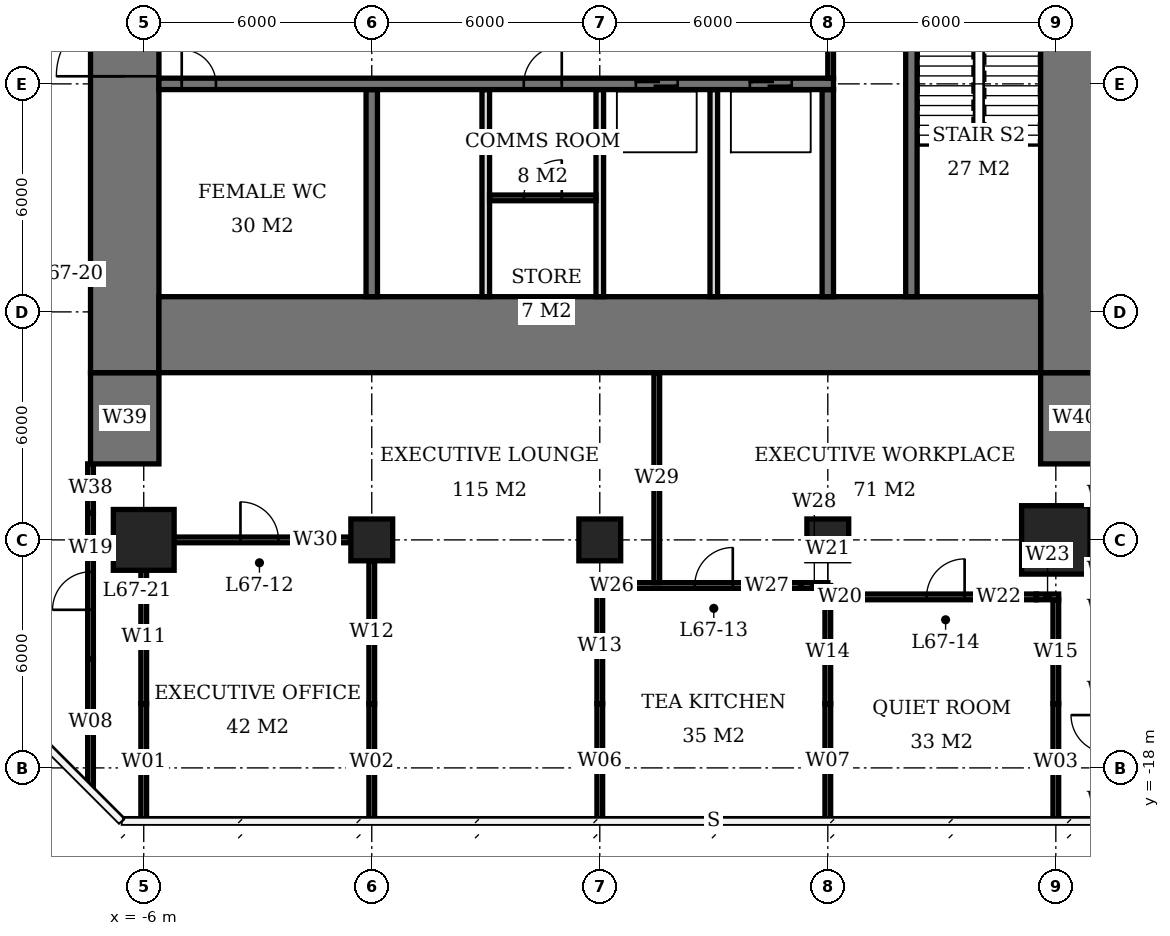
"""IFC4 building model, lengths in metres.
Left out: names, types, materials, properties, quantities, classifications, styles, units other than length and angle.
Written with IfcOpenShell. Run it as: python <this file> out.ifc"""

import sys

from ifc_helpers import new_model, si_unit, direction, frame, frame_2d, origin, origin_2d, place, context, subcontext, project, spatial, rectangle, extrude, element, fill, save


model = new_model("IFC4")
c1 = context("Model", 3, precision=1e-05, world=origin(), true_north=direction((0.0, 1.0)))
c2 = subcontext(c1, "Body", "Model", "MODEL_VIEW")
j1 = project(units=[si_unit("LENGTHUNIT", "METRE"), si_unit("PLANEANGLEUNIT", "RADIAN")], contexts=[c1])
p1 = place(None, origin())
s1 = spatial("IfcSite", under=j1, at=p1, CompositionType="ELEMENT")
p2 = place(p1, origin())
s2 = spatial("IfcBuilding", under=s1, at=p2, CompositionType="ELEMENT")
p3 = place(p2, frame((0.0, 0.0, 272.3)))
s3 = spatial("IfcBuildingStorey", under=s2, at=p3, CompositionType="ELEMENT", Elevation=272.3)
p4 = place(p3, frame((-6.0, -12.0, 0.0), z_axis=(0.0, 0.0, 1.0), x_axis=(1.0, 0.0, 0.0)))
e1 = element("IfcColumn", 1, at=p4, inside=s3, PredefinedType="COLUMN", context=c2, shape_type="SweptSolid", body=[
    extrude(rectangle(XDim=1.6, YDim=1.6, at=origin_2d()), origin(), (0.0, 0.0, 1.0), 3.9),
])
for number, where, z_axis, x_axis in (
    (2, (0.0, -12.0, 0.0), (0.0, 0.0, 1.0), (1.0, 0.0, 0.0)),
    (3, (6.0, -12.0, 0.0), (0.0, 0.0, 1.0), (1.0, 0.0, 0.0)),
    (4, (12.0, -12.0, 0.0), (0.0, 0.0, 1.0), (1.0, 0.0, 0.0)),
):
    element("IfcColumn", number, at=place(p3, frame(where, z_axis=z_axis, x_axis=x_axis)), inside=s3, PredefinedType="COLUMN", context=c2, shape_type="SweptSolid", body=[
        extrude(rectangle(XDim=1.1, YDim=1.1, at=origin_2d()), origin(), (0.0, 0.0, 1.0), 3.9),
    ])
p5 = place(p3, frame((18.0, -12.0, 0.0), z_axis=(0.0, 0.0, 1.0), x_axis=(1.0, 0.0, 0.0)))
e5 = element("IfcColumn", 5, at=p5, inside=s3, PredefinedType="COLUMN", context=c2, shape_type="SweptSolid", body=[
    extrude(rectangle(XDim=1.8, YDim=1.8, at=origin_2d()), origin(), (0.0, 0.0, 1.0), 3.9),
])
p6 = place(p3, frame((-5.6, -6.6, 0.0), z_axis=(0.0, 0.0, 1.0), x_axis=(1.0, 0.0, 0.0)))
e6 = element("IfcWall", 6, at=p6, inside=s3, PredefinedType="SHEAR", context=c2, shape_type="SweptSolid", body=[
    extrude(rectangle(XDim=23.2, YDim=2.0, at=frame_2d((11.6, 0.0))), origin(), (0.0, 0.0, 1.0), 3.9),
])
p7 = place(p3, frame((-6.5, -7.6, 0.0), z_axis=(0.0, 0.0, 1.0), x_axis=(0.0, 1.0, 0.0)))
e7 = element("IfcWall", 7, at=p7, inside=s3, PredefinedType="SHEAR", context=c2, shape_type="SweptSolid", body=[
    extrude(rectangle(XDim=21.2, YDim=1.8, at=frame_2d((10.6, 0.0))), origin(), (0.0, 0.0, 1.0), 3.9),
])
p8 = place(p7, frame((7.8, 0.0, 0.0)))
e8 = element("IfcOpeningElement", 8, at=p8, cuts=e7, PredefinedType="OPENING", context=c2, shape_type="SweptSolid", body=[
    extrude(rectangle(XDim=1.8, YDim=2.4, at=frame_2d((0.9, 1.2))), frame((0.0, 0.91, 0.0), z_axis=(0.0, -1.0, 0.0), x_axis=(1.0, 0.0, 0.0)), (0.0, 0.0, 1.0), 1.82),
])
p9 = place(p3, frame((18.5, -7.6, 0.0), z_axis=(0.0, 0.0, 1.0), x_axis=(0.0, 1.0, 0.0)))
e9 = element("IfcWall", 9, at=p9, inside=s3, PredefinedType="SHEAR", context=c2, shape_type="SweptSolid", body=[
    extrude(rectangle(XDim=21.2, YDim=1.8, at=frame_2d((10.6, 0.0))), origin(), (0.0, 0.0, 1.0), 3.9),
])
p10 = place(p9, frame((9.2, 0.0, 0.0)))
e10 = element("IfcOpeningElement", 10, at=p10, cuts=e9, PredefinedType="OPENING", context=c2, shape_type="SweptSolid", body=[
    extrude(rectangle(XDim=1.8, YDim=2.4, at=frame_2d((0.9, 1.2))), frame((0.0, 0.91, 0.0), z_axis=(0.0, -1.0, 0.0), x_axis=(1.0, 0.0, 0.0)), (0.0, 0.0, 1.0), 1.82),
])
for number, where, z_axis, x_axis in (
    (11, (-6.5, -10.0, 0.0), (0.0, 0.0, 1.0), (0.0, 1.0, 0.0)),
    (12, (18.5, -10.0, 0.0), (0.0, 0.0, 1.0), (0.0, 1.0, 0.0)),
):
    element("IfcWall", number, at=place(p3, frame(where, z_axis=z_axis, x_axis=x_axis)), inside=s3, PredefinedType="SHEAR", context=c2, shape_type="SweptSolid", body=[
        extrude(rectangle(XDim=2.4, YDim=1.8, at=frame_2d((1.2, 0.0))), origin(), (0.0, 0.0, 1.0), 3.9),
    ])
p11 = place(p3, frame((-5.6, 0.0, 0.0), z_axis=(0.0, 0.0, 1.0), x_axis=(1.0, 0.0, 0.0)))
e13 = element("IfcWall", 13, at=p11, inside=s3, PredefinedType="SHEAR", context=c2, shape_type="SweptSolid", body=[
    extrude(rectangle(XDim=17.75, YDim=0.3, at=frame_2d((8.875, 0.0))), origin(), (0.0, 0.0, 1.0), 3.9),
])
p12 = place(p11, frame((0.6, 0.0, 0.0)))
e14 = element("IfcOpeningElement", 14, at=p12, cuts=e13, PredefinedType="OPENING", context=c2, shape_type="SweptSolid", body=[
    extrude(rectangle(XDim=0.9, YDim=2.1, at=frame_2d((0.45, 1.05))), frame((0.0, 0.16, 0.0), z_axis=(0.0, -1.0, 0.0), x_axis=(1.0, 0.0, 0.0)), (0.0, 0.0, 1.0), 0.32),
])
p13 = place(p11, frame((9.6, 0.0, 0.0)))
e15 = element("IfcOpeningElement", 15, at=p13, cuts=e13, PredefinedType="OPENING", context=c2, shape_type="SweptSolid", body=[
    extrude(rectangle(XDim=1.0, YDim=2.1, at=frame_2d((0.5, 1.05))), frame((0.0, 0.16, 0.0), z_axis=(0.0, -1.0, 0.0), x_axis=(1.0, 0.0, 0.0)), (0.0, 0.0, 1.0), 0.32),
])
p14 = place(p11, frame((12.55, 0.0, 0.0)))
e16 = element("IfcOpeningElement", 16, at=p14, cuts=e13, PredefinedType="OPENING", context=c2, shape_type="SweptSolid", body=[
    extrude(rectangle(XDim=1.1, YDim=2.1, at=frame_2d((0.55, 1.05))), frame((0.0, 0.16, 0.0), z_axis=(0.0, -1.0, 0.0), x_axis=(1.0, 0.0, 0.0)), (0.0, 0.0, 1.0), 0.32),
])
p15 = place(p11, frame((15.55, 0.0, 0.0)))
e17 = element("IfcOpeningElement", 17, at=p15, cuts=e13, PredefinedType="OPENING", context=c2, shape_type="SweptSolid", body=[
    extrude(rectangle(XDim=1.1, YDim=2.1, at=frame_2d((0.55, 1.05))), frame((0.0, 0.16, 0.0), z_axis=(0.0, -1.0, 0.0), x_axis=(1.0, 0.0, 0.0)), (0.0, 0.0, 1.0), 0.32),
])
for number, where, z_axis, x_axis in (
    (18, (0.0, -5.6, 0.0), (0.0, 0.0, 1.0), (0.0, 1.0, 0.0)),
    (19, (12.0, -5.6, 0.0), (0.0, 0.0, 1.0), (0.0, 1.0, 0.0)),
):
    element("IfcWall", number, at=place(p3, frame(where, z_axis=z_axis, x_axis=x_axis)), inside=s3, PredefinedType="SHEAR", context=c2, shape_type="SweptSolid", body=[
        extrude(rectangle(XDim=5.45, YDim=0.3, at=frame_2d((2.725, 0.0))), origin(), (0.0, 0.0, 1.0), 3.9),
    ])
p16 = place(p3, frame((14.2, -5.6, 0.0), z_axis=(0.0, 0.0, 1.0), x_axis=(0.0, 1.0, 0.0)))
e20 = element("IfcWall", 20, at=p16, inside=s3, PredefinedType="SHEAR", context=c2, shape_type="SweptSolid", body=[
    extrude(rectangle(XDim=8.45, YDim=0.3, at=frame_2d((4.225, 0.0))), origin(), (0.0, 0.0, 1.0), 3.9),
])
for number, where, z_axis, x_axis in (
    (21, (3.0, -5.6, 0.0), (0.0, 0.0, 1.0), (0.0, 1.0, 0.0)),
    (22, (6.0, -5.6, 0.0), (0.0, 0.0, 1.0), (0.0, 1.0, 0.0)),
    (23, (9.0, -5.6, 0.0), (0.0, 0.0, 1.0), (0.0, 1.0, 0.0)),
):
    element("IfcWall", number, at=place(p3, frame(where, z_axis=z_axis, x_axis=x_axis)), inside=s3, PredefinedType="SOLIDWALL", context=c2, shape_type="SweptSolid", body=[
        extrude(rectangle(XDim=5.45, YDim=0.2, at=frame_2d((2.725, 0.0))), origin(), (0.0, 0.0, 1.0), 3.9),
    ])
p17 = place(p3, frame((3.1, -3.0, 0.0), z_axis=(0.0, 0.0, 1.0), x_axis=(1.0, 0.0, 0.0)))
e24 = element("IfcWall", 24, at=p17, inside=s3, PredefinedType="PARTITIONING", context=c2, shape_type="SweptSolid", body=[
    extrude(rectangle(XDim=2.8, YDim=0.15, at=frame_2d((1.4, 0.0))), origin(), (0.0, 0.0, 1.0), 3.65),
])
p18 = place(p17, frame((0.9, 0.0, 0.0)))
e25 = element("IfcOpeningElement", 25, at=p18, cuts=e24, PredefinedType="OPENING", context=c2, shape_type="SweptSolid", body=[
    extrude(rectangle(XDim=1.0, YDim=2.1, at=frame_2d((0.5, 1.05))), frame((0.0, 0.085, 0.0), z_axis=(0.0, -1.0, 0.0), x_axis=(1.0, 0.0, 0.0)), (0.0, 0.0, 1.0), 0.17),
])
p19 = place(p3, frame((11.925, -13.5, 0.0), z_axis=(0.0, 0.0, 1.0), x_axis=(1.0, 0.0, 0.0)))
e26 = element("IfcWall", 26, at=p19, inside=s3, PredefinedType="PARTITIONING", context=c2, shape_type="SweptSolid", body=[
    extrude(rectangle(XDim=0.785, YDim=0.15, at=frame_2d((0.393, 0.0))), origin(), (0.0, 0.0, 1.0), 2.65),
])
p20 = place(p3, frame((12.71, -13.5, 0.0), z_axis=(0.0, 0.0, 1.0), x_axis=(1.0, 0.0, 0.0)))
e27 = element("IfcWall", 27, at=p20, inside=s3, PredefinedType="PARTITIONING", context=c2, shape_type="SweptSolid", body=[
    extrude(rectangle(XDim=4.78, YDim=0.15, at=frame_2d((2.39, 0.0))), origin(), (0.0, 0.0, 1.0), 3.65),
])
p21 = place(p20, frame((1.89, 0.0, 0.0)))
e28 = element("IfcOpeningElement", 28, at=p21, cuts=e27, PredefinedType="OPENING", context=c2, shape_type="SweptSolid", body=[
    extrude(rectangle(XDim=1.0, YDim=2.4, at=frame_2d((0.5, 1.2))), frame((0.0, 0.085, 0.0), z_axis=(0.0, -1.0, 0.0), x_axis=(1.0, 0.0, 0.0)), (0.0, 0.0, 1.0), 0.17),
])
p22 = place(p3, frame((17.49, -13.5, 0.0), z_axis=(0.0, 0.0, 1.0), x_axis=(1.0, 0.0, 0.0)))
e29 = element("IfcWall", 29, at=p22, inside=s3, PredefinedType="PARTITIONING", context=c2, shape_type="SweptSolid", body=[
    extrude(rectangle(XDim=0.585, YDim=0.15, at=frame_2d((0.292, 0.0))), origin(), (0.0, 0.0, 1.0), 2.65),
])
p23 = place(p3, frame((5.925, -13.2, 0.0), z_axis=(0.0, 0.0, 1.0), x_axis=(1.0, 0.0, 0.0)))
e30 = element("IfcWall", 30, at=p23, inside=s3, PredefinedType="PARTITIONING", context=c2, shape_type="SweptSolid", body=[
    extrude(rectangle(XDim=0.785, YDim=0.15, at=frame_2d((0.393, 0.0))), origin(), (0.0, 0.0, 1.0), 2.65),
])
p24 = place(p3, frame((6.71, -13.2, 0.0), z_axis=(0.0, 0.0, 1.0), x_axis=(1.0, 0.0, 0.0)))
e31 = element("IfcWall", 31, at=p24, inside=s3, PredefinedType="PARTITIONING", context=c2, shape_type="SweptSolid", body=[
    extrude(rectangle(XDim=4.58, YDim=0.15, at=frame_2d((2.29, 0.0))), origin(), (0.0, 0.0, 1.0), 3.65),
])
p25 = place(p24, frame((1.79, 0.0, 0.0)))
e32 = element("IfcOpeningElement", 32, at=p25, cuts=e31, PredefinedType="OPENING", context=c2, shape_type="SweptSolid", body=[
    extrude(rectangle(XDim=1.0, YDim=2.4, at=frame_2d((0.5, 1.2))), frame((0.0, 0.085, 0.0), z_axis=(0.0, -1.0, 0.0), x_axis=(1.0, 0.0, 0.0)), (0.0, 0.0, 1.0), 0.17),
])
p26 = place(p3, frame((11.29, -13.2, 0.0), z_axis=(0.0, 0.0, 1.0), x_axis=(1.0, 0.0, 0.0)))
e33 = element("IfcWall", 33, at=p26, inside=s3, PredefinedType="PARTITIONING", context=c2, shape_type="SweptSolid", body=[
    extrude(rectangle(XDim=0.71, YDim=0.15, at=frame_2d((0.355, 0.0))), origin(), (0.0, 0.0, 1.0), 2.65),
])
p27 = place(p3, frame((-5.2, -12.0, 0.0), z_axis=(0.0, 0.0, 1.0), x_axis=(1.0, 0.0, 0.0)))
e34 = element("IfcWall", 34, at=p27, inside=s3, PredefinedType="PARTITIONING", context=c2, shape_type="SweptSolid", body=[
    extrude(rectangle(XDim=4.64, YDim=0.15, at=frame_2d((2.32, 0.0))), origin(), (0.0, 0.0, 1.0), 3.65),
])
p28 = place(p27, frame((1.745, 0.0, 0.0)))
e35 = element("IfcOpeningElement", 35, at=p28, cuts=e34, PredefinedType="OPENING", context=c2, shape_type="SweptSolid", body=[
    extrude(rectangle(XDim=1.0, YDim=2.4, at=frame_2d((0.5, 1.2))), frame((0.0, 0.085, 0.0), z_axis=(0.0, -1.0, 0.0), x_axis=(1.0, 0.0, 0.0)), (0.0, 0.0, 1.0), 0.17),
])
p29 = place(p3, frame((-6.0, -19.375, 0.0), z_axis=(0.0, 0.0, 1.0), x_axis=(0.0, 1.0, 0.0)))
e36 = element("IfcWall", 36, at=p29, inside=s3, PredefinedType="PARTITIONING", context=c2, shape_type="SweptSolid", body=[
    extrude(rectangle(XDim=3.065, YDim=0.15, at=frame_2d((1.532, 0.0))), origin(), (0.0, 0.0, 1.0), 3.65),
])
p30 = place(p3, frame((-6.0, -16.31, 0.0), z_axis=(0.0, 0.0, 1.0), x_axis=(0.0, 1.0, 0.0)))
e37 = element("IfcWall", 37, at=p30, inside=s3, PredefinedType="PARTITIONING", context=c2, shape_type="SweptSolid", body=[
    extrude(rectangle(XDim=3.51, YDim=0.15, at=frame_2d((1.755, 0.0))), origin(), (0.0, 0.0, 1.0), 2.65),
])
p31 = place(p3, frame((0.0, -19.375, 0.0), z_axis=(0.0, 0.0, 1.0), x_axis=(0.0, 1.0, 0.0)))
e38 = element("IfcWall", 38, at=p31, inside=s3, PredefinedType="PARTITIONING", context=c2, shape_type="SweptSolid", body=[
    extrude(rectangle(XDim=3.065, YDim=0.15, at=frame_2d((1.532, 0.0))), origin(), (0.0, 0.0, 1.0), 3.65),
])
p32 = place(p3, frame((0.0, -16.31, 0.0), z_axis=(0.0, 0.0, 1.0), x_axis=(0.0, 1.0, 0.0)))
e39 = element("IfcWall", 39, at=p32, inside=s3, PredefinedType="PARTITIONING", context=c2, shape_type="SweptSolid", body=[
    extrude(rectangle(XDim=3.76, YDim=0.15, at=frame_2d((1.88, 0.0))), origin(), (0.0, 0.0, 1.0), 2.65),
])
p33 = place(p3, frame((6.0, -19.35, 0.0), z_axis=(0.0, 0.0, 1.0), x_axis=(0.0, 1.0, 0.0)))
e40 = element("IfcWall", 40, at=p33, inside=s3, PredefinedType="PARTITIONING", context=c2, shape_type="SweptSolid", body=[
    extrude(rectangle(XDim=3.04, YDim=0.15, at=frame_2d((1.52, 0.0))), origin(), (0.0, 0.0, 1.0), 3.65),
])
p34 = place(p3, frame((6.0, -16.31, 0.0), z_axis=(0.0, 0.0, 1.0), x_axis=(0.0, 1.0, 0.0)))
e41 = element("IfcWall", 41, at=p34, inside=s3, PredefinedType="PARTITIONING", context=c2, shape_type="SweptSolid", body=[
    extrude(rectangle(XDim=3.035, YDim=0.15, at=frame_2d((1.518, 0.0))), origin(), (0.0, 0.0, 1.0), 2.65),
])
p35 = place(p3, frame((12.0, -19.35, 0.0), z_axis=(0.0, 0.0, 1.0), x_axis=(0.0, 1.0, 0.0)))
e42 = element("IfcWall", 42, at=p35, inside=s3, PredefinedType="PARTITIONING", context=c2, shape_type="SweptSolid", body=[
    extrude(rectangle(XDim=3.04, YDim=0.15, at=frame_2d((1.52, 0.0))), origin(), (0.0, 0.0, 1.0), 3.65),
])
p36 = place(p3, frame((12.0, -16.31, 0.0), z_axis=(0.0, 0.0, 1.0), x_axis=(0.0, 1.0, 0.0)))
e43 = element("IfcWall", 43, at=p36, inside=s3, PredefinedType="PARTITIONING", context=c2, shape_type="SweptSolid", body=[
    extrude(rectangle(XDim=2.735, YDim=0.15, at=frame_2d((1.368, 0.0))), origin(), (0.0, 0.0, 1.0), 2.65),
])
p37 = place(p3, frame((12.0, -13.5, 0.0), z_axis=(0.0, 0.0, 1.0), x_axis=(0.0, 1.0, 0.0)))
e44 = element("IfcWall", 44, at=p37, inside=s3, PredefinedType="PARTITIONING", context=c2, shape_type="SweptSolid", body=[
    extrude(rectangle(XDim=0.3, YDim=0.15, at=frame_2d((0.15, 0.0))), origin(), (0.0, 0.0, 1.0), 2.65),
])
p38 = place(p3, frame((18.0, -19.375, 0.0), z_axis=(0.0, 0.0, 1.0), x_axis=(0.0, 1.0, 0.0)))
e45 = element("IfcWall", 45, at=p38, inside=s3, PredefinedType="PARTITIONING", context=c2, shape_type="SweptSolid", body=[
    extrude(rectangle(XDim=3.065, YDim=0.15, at=frame_2d((1.532, 0.0))), origin(), (0.0, 0.0, 1.0), 3.65),
])
p39 = place(p3, frame((18.0, -16.31, 0.0), z_axis=(0.0, 0.0, 1.0), x_axis=(0.0, 1.0, 0.0)))
e46 = element("IfcWall", 46, at=p39, inside=s3, PredefinedType="PARTITIONING", context=c2, shape_type="SweptSolid", body=[
    extrude(rectangle(XDim=2.735, YDim=0.15, at=frame_2d((1.368, 0.0))), origin(), (0.0, 0.0, 1.0), 2.65),
])
p40 = place(p3, frame((-7.4, -18.464, 0.0), z_axis=(0.0, 0.0, 1.0), x_axis=(0.0, 1.0, 0.0)))
e47 = element("IfcWall", 47, at=p40, inside=s3, PredefinedType="PARTITIONING", context=c2, shape_type="SweptSolid", body=[
    extrude(rectangle(XDim=3.324, YDim=0.15, at=frame_2d((1.662, 0.0))), origin(), (0.0, 0.0, 1.0), 3.65),
])
p41 = place(p3, frame((-7.4, -15.14, 0.0), z_axis=(0.0, 0.0, 1.0), x_axis=(0.0, 1.0, 0.0)))
e48 = element("IfcWall", 48, at=p41, inside=s3, PredefinedType="PARTITIONING", context=c2, shape_type="SweptSolid", body=[
    extrude(rectangle(XDim=3.85, YDim=0.15, at=frame_2d((1.925, 0.0))), origin(), (0.0, 0.0, 1.0), 2.65),
])
p42 = place(p41, frame((1.3, 0.0, 0.0)))
e49 = element("IfcOpeningElement", 49, at=p42, cuts=e48, PredefinedType="OPENING", context=c2, shape_type="SweptSolid", body=[
    extrude(rectangle(XDim=1.0, YDim=2.1, at=frame_2d((0.5, 1.05))), frame((0.0, 0.085, 0.0), z_axis=(0.0, -1.0, 0.0), x_axis=(1.0, 0.0, 0.0)), (0.0, 0.0, 1.0), 0.17),
])
p43 = place(p3, frame((-7.4, -11.29, 0.0), z_axis=(0.0, 0.0, 1.0), x_axis=(0.0, 1.0, 0.0)))
e50 = element("IfcWall", 50, at=p43, inside=s3, PredefinedType="PARTITIONING", context=c2, shape_type="SweptSolid", body=[
    extrude(rectangle(XDim=1.29, YDim=0.15, at=frame_2d((0.645, 0.0))), origin(), (0.0, 0.0, 1.0), 3.65),
])
p44 = place(p3, frame((7.5, -13.125, 0.0), z_axis=(0.0, 0.0, 1.0), x_axis=(0.0, 1.0, 0.0)))
e51 = element("IfcWall", 51, at=p44, inside=s3, PredefinedType="PARTITIONING", context=c2, shape_type="SweptSolid", body=[
    extrude(rectangle(XDim=5.525, YDim=0.15, at=frame_2d((2.762, 0.0))), origin(), (0.0, 0.0, 1.0), 3.65),
])
p45 = place(p3, frame((12.075, 0.15, 0.0), z_axis=(0.0, 0.0, 1.0), x_axis=(0.0, 1.0, 0.0)))
e52 = element("IfcWall", 52, at=p45, inside=s3, PredefinedType="PARTITIONING", context=c2, shape_type="SweptSolid", body=[
    extrude(rectangle(XDim=3.0, YDim=0.15, at=frame_2d((1.5, 0.0))), origin(), (0.0, 0.0, 1.0), 3.65),
])
p46 = place(p8, origin())
e53 = element("IfcDoor", 53, at=p46, inside=s3, OperationType="DOUBLE_DOOR_SINGLE_SWING", PredefinedType="DOOR", context=c2, shape_type="SweptSolid", body=[
    extrude(rectangle(XDim=1.8, YDim=2.4, at=frame_2d((0.9, 1.2))), frame((0.0, 0.025, 0.0), z_axis=(0.0, -1.0, 0.0), x_axis=(1.0, 0.0, 0.0)), (0.0, 0.0, 1.0), 0.05),
])
fill(e8, e53)
p47 = place(p12, origin())
e54 = element("IfcDoor", 54, at=p47, inside=s3, OperationType="SINGLE_SWING_LEFT", PredefinedType="DOOR", context=c2, shape_type="SweptSolid", body=[
    extrude(rectangle(XDim=0.9, YDim=2.1, at=frame_2d((0.45, 1.05))), frame((0.0, 0.025, 0.0), z_axis=(0.0, -1.0, 0.0), x_axis=(1.0, 0.0, 0.0)), (0.0, 0.0, 1.0), 0.05),
])
fill(e14, e54)
p48 = place(p18, origin())
e55 = element("IfcDoor", 55, at=p48, inside=s3, OperationType="SINGLE_SWING_RIGHT", PredefinedType="DOOR", context=c2, shape_type="SweptSolid", body=[
    extrude(rectangle(XDim=1.0, YDim=2.1, at=frame_2d((0.5, 1.05))), frame((0.0, 0.025, 0.0), z_axis=(0.0, -1.0, 0.0), x_axis=(1.0, 0.0, 0.0)), (0.0, 0.0, 1.0), 0.05),
])
fill(e25, e55)
p49 = place(p13, origin())
e56 = element("IfcDoor", 56, at=p49, inside=s3, OperationType="SINGLE_SWING_RIGHT", PredefinedType="DOOR", context=c2, shape_type="SweptSolid", body=[
    extrude(rectangle(XDim=1.0, YDim=2.1, at=frame_2d((0.5, 1.05))), frame((0.0, 0.025, 0.0), z_axis=(0.0, -1.0, 0.0), x_axis=(1.0, 0.0, 0.0)), (0.0, 0.0, 1.0), 0.05),
])
fill(e15, e56)
p50 = place(p14, origin())
e57 = element("IfcDoor", 57, at=p50, inside=s3, OperationType="DOUBLE_DOOR_SLIDING", PredefinedType="USERDEFINED", context=c2, shape_type="SweptSolid", body=[
    extrude(rectangle(XDim=1.1, YDim=2.1, at=frame_2d((0.55, 1.05))), frame((0.0, 0.025, 0.0), z_axis=(0.0, -1.0, 0.0), x_axis=(1.0, 0.0, 0.0)), (0.0, 0.0, 1.0), 0.05),
])
fill(e16, e57)
p51 = place(p15, origin())
e58 = element("IfcDoor", 58, at=p51, inside=s3, OperationType="DOUBLE_DOOR_SLIDING", PredefinedType="USERDEFINED", context=c2, shape_type="SweptSolid", body=[
    extrude(rectangle(XDim=1.1, YDim=2.1, at=frame_2d((0.55, 1.05))), frame((0.0, 0.025, 0.0), z_axis=(0.0, -1.0, 0.0), x_axis=(1.0, 0.0, 0.0)), (0.0, 0.0, 1.0), 0.05),
])
fill(e17, e58)
p52 = place(p28, origin())
e59 = element("IfcDoor", 59, at=p52, inside=s3, OperationType="SINGLE_SWING_LEFT", PredefinedType="DOOR", context=c2, shape_type="SweptSolid", body=[
    extrude(rectangle(XDim=1.0, YDim=2.4, at=frame_2d((0.5, 1.2))), frame((0.0, 0.025, 0.0), z_axis=(0.0, -1.0, 0.0), x_axis=(1.0, 0.0, 0.0)), (0.0, 0.0, 1.0), 0.05),
])
fill(e35, e59)
p53 = place(p25, origin())
e60 = element("IfcDoor", 60, at=p53, inside=s3, OperationType="SINGLE_SWING_RIGHT", PredefinedType="DOOR", context=c2, shape_type="SweptSolid", body=[
    extrude(rectangle(XDim=1.0, YDim=2.4, at=frame_2d((0.5, 1.2))), frame((0.0, 0.025, 0.0), z_axis=(0.0, -1.0, 0.0), x_axis=(1.0, 0.0, 0.0)), (0.0, 0.0, 1.0), 0.05),
])
fill(e32, e60)
p54 = place(p21, origin())
e61 = element("IfcDoor", 61, at=p54, inside=s3, OperationType="SINGLE_SWING_RIGHT", PredefinedType="DOOR", context=c2, shape_type="SweptSolid", body=[
    extrude(rectangle(XDim=1.0, YDim=2.4, at=frame_2d((0.5, 1.2))), frame((0.0, 0.025, 0.0), z_axis=(0.0, -1.0, 0.0), x_axis=(1.0, 0.0, 0.0)), (0.0, 0.0, 1.0), 0.05),
])
fill(e28, e61)
p55 = place(p42, origin())
e62 = element("IfcDoor", 62, at=p55, inside=s3, OperationType="SINGLE_SWING_LEFT", PredefinedType="DOOR", context=c2, shape_type="SweptSolid", body=[
    extrude(rectangle(XDim=1.0, YDim=2.1, at=frame_2d((0.5, 1.05))), frame((0.0, 0.025, 0.0), z_axis=(0.0, -1.0, 0.0), x_axis=(1.0, 0.0, 0.0)), (0.0, 0.0, 1.0), 0.05),
])
fill(e49, e62)
save(model, sys.argv[1])
